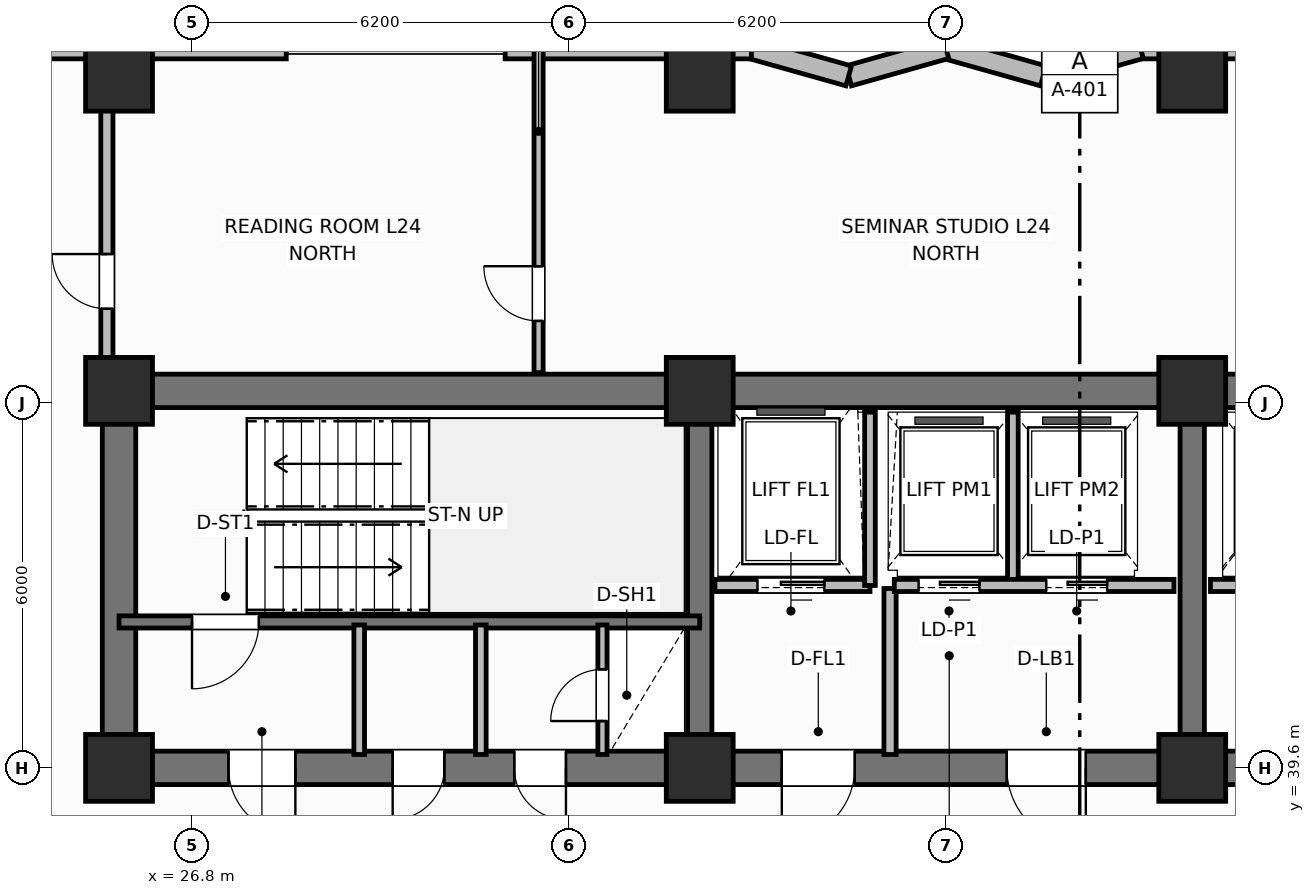
"""IFC4 building model, lengths in metres.
Left out: names, types, materials, properties, quantities, classifications, styles, units other than length and angle.
Written with IfcOpenShell. Run it as: python <this file> out.ifc"""

import sys

from ifc_helpers import new_model, si_unit, direction, frame, frame_2d, origin, origin_2d, place, context, subcontext, project, spatial, rectangle, extrude, element, fill, save


model = new_model("IFC4")
c1 = context("Model", 3, precision=1e-05, world=origin(), true_north=direction((0.0, 1.0)))
c2 = subcontext(c1, "Body", "Model", "MODEL_VIEW")
j1 = project(units=[si_unit("LENGTHUNIT", "METRE"), si_unit("PLANEANGLEUNIT", "RADIAN")], contexts=[c1])
p1 = place(None, origin())
s1 = spatial("IfcSite", under=j1, at=p1, CompositionType="ELEMENT")
p2 = place(p1, origin())
s2 = spatial("IfcBuilding", under=s1, at=p2, CompositionType="ELEMENT")
p3 = place(p2, frame((0.0, 0.0, 99.4)))
s3 = spatial("IfcBuildingStorey", under=s2, at=p3, CompositionType="ELEMENT", Elevation=99.4)
p4 = place(p3, frame((25.6, 45.8, 0.0), z_axis=(0.0, 0.0, 1.0), x_axis=(1.0, 0.0, 0.0)))
e1 = element("IfcWall", 1, at=p4, inside=s3, PredefinedType="SHEAR", context=c2, shape_type="SweptSolid", body=[
    extrude(rectangle(XDim=27.2, YDim=0.55, at=frame_2d((13.6, 0.0))), origin(), (0.0, 0.0, 1.0), 3.7),
])
p5 = place(p3, frame((25.6, 39.875, 0.0), z_axis=(0.0, 0.0, 1.0), x_axis=(0.0, 1.0, 0.0)))
e2 = element("IfcWall", 2, at=p5, inside=s3, PredefinedType="SHEAR", context=c2, shape_type="SweptSolid", body=[
    extrude(rectangle(XDim=5.65, YDim=0.55, at=frame_2d((2.825, 0.0))), origin(), (0.0, 0.0, 1.0), 3.7),
])
p6 = place(p3, frame((52.8, 39.6, 0.0), z_axis=(0.0, 0.0, 1.0), x_axis=(-1.0, 0.0, 0.0)))
e3 = element("IfcWall", 3, at=p6, inside=s3, PredefinedType="SHEAR", context=c2, shape_type="SweptSolid", body=[
    extrude(rectangle(XDim=27.2, YDim=0.55, at=frame_2d((13.6, 0.0))), origin(), (0.0, 0.0, 1.0), 3.7),
])
p7 = place(p6, frame((24.3, 0.0, 0.0)))
e4 = element("IfcOpeningElement", 4, at=p7, cuts=e3, PredefinedType="OPENING", context=c2, shape_type="SweptSolid", body=[
    extrude(rectangle(XDim=1.1, YDim=2.15, at=frame_2d((0.55, 1.075))), frame((0.0, 0.285, 0.0), z_axis=(0.0, -1.0, 0.0), x_axis=(1.0, 0.0, 0.0)), (0.0, 0.0, 1.0), 0.57),
])
p8 = place(p6, frame((21.85, 0.0, 0.0)))
e5 = element("IfcOpeningElement", 5, at=p8, cuts=e3, PredefinedType="OPENING", context=c2, shape_type="SweptSolid", body=[
    extrude(rectangle(XDim=0.85, YDim=2.1, at=frame_2d((0.425, 1.05))), frame((0.0, 0.285, 0.0), z_axis=(0.0, -1.0, 0.0), x_axis=(1.0, 0.0, 0.0)), (0.0, 0.0, 1.0), 0.57),
])
p9 = place(p6, frame((19.85, 0.0, 0.0)))
e6 = element("IfcOpeningElement", 6, at=p9, cuts=e3, PredefinedType="OPENING", context=c2, shape_type="SweptSolid", body=[
    extrude(rectangle(XDim=0.85, YDim=2.1, at=frame_2d((0.425, 1.05))), frame((0.0, 0.285, 0.0), z_axis=(0.0, -1.0, 0.0), x_axis=(1.0, 0.0, 0.0)), (0.0, 0.0, 1.0), 0.57),
])
p10 = place(p6, frame((15.1, 0.0, 0.0)))
e7 = element("IfcOpeningElement", 7, at=p10, cuts=e3, PredefinedType="OPENING", context=c2, shape_type="SweptSolid", body=[
    extrude(rectangle(XDim=1.2, YDim=2.15, at=frame_2d((0.6, 1.075))), frame((0.0, 0.285, 0.0), z_axis=(0.0, -1.0, 0.0), x_axis=(1.0, 0.0, 0.0)), (0.0, 0.0, 1.0), 0.57),
])
p11 = place(p6, frame((11.3, 0.0, 0.0)))
e8 = element("IfcOpeningElement", 8, at=p11, cuts=e3, PredefinedType="OPENING", context=c2, shape_type="SweptSolid", body=[
    extrude(rectangle(XDim=1.3, YDim=2.2, at=frame_2d((0.65, 1.1))), frame((0.0, 0.285, 0.0), z_axis=(0.0, -1.0, 0.0), x_axis=(1.0, 0.0, 0.0)), (0.0, 0.0, 1.0), 0.57),
])
p12 = place(p6, frame((7.25, 0.0, 0.0)))
e9 = element("IfcOpeningElement", 9, at=p12, cuts=e3, PredefinedType="OPENING", context=c2, shape_type="SweptSolid", body=[
    extrude(rectangle(XDim=0.85, YDim=2.1, at=frame_2d((0.425, 1.05))), frame((0.0, 0.285, 0.0), z_axis=(0.0, -1.0, 0.0), x_axis=(1.0, 0.0, 0.0)), (0.0, 0.0, 1.0), 0.57),
])
p13 = place(p6, frame((4.6, 0.0, 0.0)))
e10 = element("IfcOpeningElement", 10, at=p13, cuts=e3, PredefinedType="OPENING", context=c2, shape_type="SweptSolid", body=[
    extrude(rectangle(XDim=0.85, YDim=2.1, at=frame_2d((0.425, 1.05))), frame((0.0, 0.285, 0.0), z_axis=(0.0, -1.0, 0.0), x_axis=(1.0, 0.0, 0.0)), (0.0, 0.0, 1.0), 0.57),
])
p14 = place(p6, frame((1.9, 0.0, 0.0)))
e11 = element("IfcOpeningElement", 11, at=p14, cuts=e3, PredefinedType="OPENING", context=c2, shape_type="SweptSolid", body=[
    extrude(rectangle(XDim=0.85, YDim=2.1, at=frame_2d((0.425, 1.05))), frame((0.0, 0.285, 0.0), z_axis=(0.0, -1.0, 0.0), x_axis=(1.0, 0.0, 0.0)), (0.0, 0.0, 1.0), 0.57),
])
for number, where, z_axis, x_axis in (
    (12, (35.15, 39.875, 0.0), (0.0, 0.0, 1.0), (0.0, 1.0, 0.0)),
    (13, (43.25, 39.875, 0.0), (0.0, 0.0, 1.0), (0.0, 1.0, 0.0)),
):
    element("IfcWall", number, at=place(p3, frame(where, z_axis=z_axis, x_axis=x_axis)), inside=s3, PredefinedType="SHEAR", context=c2, shape_type="SweptSolid", body=[
        extrude(rectangle(XDim=5.65, YDim=0.4, at=frame_2d((2.825, 0.0))), origin(), (0.0, 0.0, 1.0), 3.7),
    ])
for number, where, z_axis, x_axis in (
    (14, (25.6, 39.6, 0.0), (0.0, 0.0, 1.0), (1.0, 0.0, 0.0)),
    (15, (25.6, 45.8, 0.0), (0.0, 0.0, 1.0), (1.0, 0.0, 0.0)),
    (16, (35.15, 39.6, 0.0), (0.0, 0.0, 1.0), (1.0, 0.0, 0.0)),
    (17, (35.15, 45.8, 0.0), (0.0, 0.0, 1.0), (1.0, 0.0, 0.0)),
    (18, (43.25, 39.6, 0.0), (0.0, 0.0, 1.0), (1.0, 0.0, 0.0)),
    (19, (43.25, 45.8, 0.0), (0.0, 0.0, 1.0), (1.0, 0.0, 0.0)),
    (20, (25.6, 50.95, 0.0), (0.0, 0.0, 1.0), (1.0, 0.0, 0.0)),
    (21, (35.15, 50.95, 0.0), (0.0, 0.0, 1.0), (1.0, 0.0, 0.0)),
    (22, (43.25, 50.95, 0.0), (0.0, 0.0, 1.0), (1.0, 0.0, 0.0)),
):
    element("IfcColumn", number, at=place(p3, frame(where, z_axis=z_axis, x_axis=x_axis)), inside=s3, PredefinedType="COLUMN", context=c2, shape_type="SweptSolid", body=[
        extrude(rectangle(XDim=1.1, YDim=1.1, at=origin_2d()), origin(), (0.0, 0.0, 1.0), 3.7),
    ])
p15 = place(p3, frame((55.35, 51.43, 0.0), z_axis=(0.0, 0.0, 1.0), x_axis=(-1.0, 0.0, 0.0)))
e23 = element("IfcWall", 23, at=p15, inside=s3, PredefinedType="SOLIDWALL", context=c2, shape_type="SweptSolid", body=[
    extrude(rectangle(XDim=12.95, YDim=0.34, at=frame_2d((6.475, 0.0))), origin(), (0.0, 0.0, 1.0), 2.7),
])
p16 = place(p15, frame((5.775, 0.0, 0.73)))
e24 = element("IfcOpeningElement", 24, at=p16, cuts=e23, PredefinedType="OPENING", context=c2, shape_type="SweptSolid", body=[
    extrude(rectangle(XDim=1.4, YDim=1.85, at=frame_2d((0.7, 0.925))), frame((0.0, 0.18, 0.0), z_axis=(0.0, -1.0, 0.0), x_axis=(1.0, 0.0, 0.0)), (0.0, 0.0, 1.0), 0.36),
])
p17 = place(p3, frame((42.4, 51.43, 0.0), z_axis=(0.0, 0.0, 1.0), x_axis=(-0.962652136636, -0.270741322725, 0.0)))
e25 = element("IfcWall", 25, at=p17, inside=s3, PredefinedType="SOLIDWALL", context=c2, shape_type="SweptSolid", body=[
    extrude(rectangle(XDim=1.662, YDim=0.34, at=frame_2d((0.831, 0.0))), origin(), (0.0, 0.0, 1.0), 2.7),
])
p18 = place(p3, frame((40.8, 50.98, 0.0), z_axis=(0.0, 0.0, 1.0), x_axis=(-0.962662902433, 0.270703040766, 0.0)))
e26 = element("IfcWall", 26, at=p18, inside=s3, PredefinedType="SOLIDWALL", context=c2, shape_type="SweptSolid", body=[
    extrude(rectangle(XDim=1.662, YDim=0.34, at=frame_2d((0.831, 0.0))), origin(), (0.0, 0.0, 1.0), 2.7),
])
p19 = place(p3, frame((39.2, 51.43, 0.0), z_axis=(0.0, 0.0, 1.0), x_axis=(-0.962652136636, -0.270741322725, 0.0)))
e27 = element("IfcWall", 27, at=p19, inside=s3, PredefinedType="SOLIDWALL", context=c2, shape_type="SweptSolid", body=[
    extrude(rectangle(XDim=1.662, YDim=0.34, at=frame_2d((0.831, 0.0))), origin(), (0.0, 0.0, 1.0), 2.7),
])
p20 = place(p3, frame((37.6, 50.98, 0.0), z_axis=(0.0, 0.0, 1.0), x_axis=(-0.962662902433, 0.270703040766, 0.0)))
e28 = element("IfcWall", 28, at=p20, inside=s3, PredefinedType="SOLIDWALL", context=c2, shape_type="SweptSolid", body=[
    extrude(rectangle(XDim=1.662, YDim=0.34, at=frame_2d((0.831, 0.0))), origin(), (0.0, 0.0, 1.0), 2.7),
])
p21 = place(p3, frame((36.0, 51.43, 0.0), z_axis=(0.0, 0.0, 1.0), x_axis=(-1.0, 0.0, 0.0)))
e29 = element("IfcWall", 29, at=p21, inside=s3, PredefinedType="SOLIDWALL", context=c2, shape_type="SweptSolid", body=[
    extrude(rectangle(XDim=4.05, YDim=0.34, at=frame_2d((2.025, 0.0))), origin(), (0.0, 0.0, 1.0), 2.7),
])
p22 = place(p3, frame((28.35, 51.43, 0.0), z_axis=(0.0, 0.0, 1.0), x_axis=(-1.0, 0.0, 0.0)))
e30 = element("IfcWall", 30, at=p22, inside=s3, PredefinedType="SOLIDWALL", context=c2, shape_type="SweptSolid", body=[
    extrude(rectangle(XDim=9.75, YDim=0.34, at=frame_2d((4.875, 0.0))), origin(), (0.0, 0.0, 1.0), 2.7),
])
p23 = place(p22, frame((6.992, 0.0, 0.73)))
e31 = element("IfcOpeningElement", 31, at=p23, cuts=e30, PredefinedType="OPENING", context=c2, shape_type="SweptSolid", body=[
    extrude(rectangle(XDim=1.4, YDim=1.85, at=frame_2d((0.7, 0.925))), frame((0.0, 0.18, 0.0), z_axis=(0.0, -1.0, 0.0), x_axis=(1.0, 0.0, 0.0)), (0.0, 0.0, 1.0), 0.36),
])
p24 = place(p3, frame((35.15, 42.0, 0.0), z_axis=(0.0, 0.0, 1.0), x_axis=(-1.0, 0.0, 0.0)))
e32 = element("IfcWall", 32, at=p24, inside=s3, PredefinedType="SHEAR", context=c2, shape_type="SweptSolid", body=[
    extrude(rectangle(XDim=9.55, YDim=0.2, at=frame_2d((4.775, 0.0))), origin(), (0.0, 0.0, 1.0), 3.7),
])
p25 = place(p24, frame((7.25, 0.0, 0.0)))
e33 = element("IfcOpeningElement", 33, at=p25, cuts=e32, PredefinedType="OPENING", context=c2, shape_type="SweptSolid", body=[
    extrude(rectangle(XDim=1.1, YDim=2.15, at=frame_2d((0.55, 1.075))), frame((0.0, 0.11, 0.0), z_axis=(0.0, -1.0, 0.0), x_axis=(1.0, 0.0, 0.0)), (0.0, 0.0, 1.0), 0.22),
])
p26 = place(p3, frame((33.55, 39.82, 0.0), z_axis=(0.0, 0.0, 1.0), x_axis=(0.0, 1.0, 0.0)))
e34 = element("IfcWall", 34, at=p26, inside=s3, PredefinedType="PARTITIONING", context=c2, shape_type="SweptSolid", body=[
    extrude(rectangle(XDim=2.13, YDim=0.15, at=frame_2d((1.065, 0.0))), origin(), (0.0, 0.0, 1.0), 2.53),
])
p27 = place(p26, frame((0.55, 0.0, 0.0)))
e35 = element("IfcOpeningElement", 35, at=p27, cuts=e34, PredefinedType="OPENING", context=c2, shape_type="SweptSolid", body=[
    extrude(rectangle(XDim=0.85, YDim=2.05, at=frame_2d((0.425, 1.025))), frame((0.0, 0.085, 0.0), z_axis=(0.0, -1.0, 0.0), x_axis=(1.0, 0.0, 0.0)), (0.0, 0.0, 1.0), 0.17),
])
for number, where, z_axis, x_axis in (
    (36, (29.55, 39.82, 0.0), (0.0, 0.0, 1.0), (0.0, 1.0, 0.0)),
    (37, (31.55, 39.82, 0.0), (0.0, 0.0, 1.0), (0.0, 1.0, 0.0)),
):
    element("IfcWall", number, at=place(p3, frame(where, z_axis=z_axis, x_axis=x_axis)), inside=s3, PredefinedType="PARTITIONING", context=c2, shape_type="SweptSolid", body=[
        extrude(rectangle(XDim=2.13, YDim=0.175, at=frame_2d((1.065, 0.0))), origin(), (0.0, 0.0, 1.0), 2.53),
    ])
p28 = place(p3, frame((37.95, 42.6, 0.0), z_axis=(0.0, 0.0, 1.0), x_axis=(-1.0, 0.0, 0.0)))
e38 = element("IfcWall", 38, at=p28, inside=s3, PredefinedType="PARTITIONING", context=c2, shape_type="SweptSolid", body=[
    extrude(rectangle(XDim=2.55, YDim=0.2, at=frame_2d((1.275, 0.0))), origin(), (0.0, 0.0, 1.0), 2.3),
])
p29 = place(p28, frame((0.75, 0.0, 0.0)))
e39 = element("IfcOpeningElement", 39, at=p29, cuts=e38, PredefinedType="OPENING", context=c2, shape_type="SweptSolid", body=[
    extrude(rectangle(XDim=1.1, YDim=2.15, at=frame_2d((0.55, 1.075))), frame((0.0, 0.11, 0.0), z_axis=(0.0, -1.0, 0.0), x_axis=(1.0, 0.0, 0.0)), (0.0, 0.0, 1.0), 0.22),
])
p30 = place(p3, frame((37.95, 42.6, 0.0), z_axis=(0.0, 0.0, 1.0), x_axis=(0.0, 1.0, 0.0)))
e40 = element("IfcWall", 40, at=p30, inside=s3, PredefinedType="PARTITIONING", context=c2, shape_type="SweptSolid", body=[
    extrude(rectangle(XDim=2.85, YDim=0.175, at=frame_2d((1.425, 0.0))), origin(), (0.0, 0.0, 1.0), 2.53),
])
p31 = place(p3, frame((38.28, 39.82, 0.0), z_axis=(0.0, 0.0, 1.0), x_axis=(0.0, 1.0, 0.0)))
e41 = element("IfcWall", 41, at=p31, inside=s3, PredefinedType="PARTITIONING", context=c2, shape_type="SweptSolid", body=[
    extrude(rectangle(XDim=2.73, YDim=0.2, at=frame_2d((1.365, 0.0))), origin(), (0.0, 0.0, 1.0), 2.53),
])
p32 = place(p3, frame((40.3, 42.65, 0.0), z_axis=(0.0, 0.0, 1.0), x_axis=(0.0, 1.0, 0.0)))
e42 = element("IfcWall", 42, at=p32, inside=s3, PredefinedType="PARTITIONING", context=c2, shape_type="SweptSolid", body=[
    extrude(rectangle(XDim=2.8, YDim=0.175, at=frame_2d((1.4, 0.0))), origin(), (0.0, 0.0, 1.0), 2.53),
])
p33 = place(p3, frame((42.95, 42.6, 0.0), z_axis=(0.0, 0.0, 1.0), x_axis=(-1.0, 0.0, 0.0)))
e43 = element("IfcWall", 43, at=p33, inside=s3, PredefinedType="PARTITIONING", context=c2, shape_type="SweptSolid", body=[
    extrude(rectangle(XDim=4.6, YDim=0.2, at=frame_2d((2.3, 0.0))), origin(), (0.0, 0.0, 1.0), 2.3),
])
p34 = place(p33, frame((3.2, 0.0, 0.0)))
e44 = element("IfcOpeningElement", 44, at=p34, cuts=e43, PredefinedType="OPENING", context=c2, shape_type="SweptSolid", body=[
    extrude(rectangle(XDim=1.0, YDim=2.15, at=frame_2d((0.5, 1.075))), frame((0.0, 0.11, 0.0), z_axis=(0.0, -1.0, 0.0), x_axis=(1.0, 0.0, 0.0)), (0.0, 0.0, 1.0), 0.22),
])
p35 = place(p33, frame((1.1, 0.0, 0.0)))
e45 = element("IfcOpeningElement", 45, at=p35, cuts=e43, PredefinedType="OPENING", context=c2, shape_type="SweptSolid", body=[
    extrude(rectangle(XDim=1.0, YDim=2.15, at=frame_2d((0.5, 1.075))), frame((0.0, 0.11, 0.0), z_axis=(0.0, -1.0, 0.0), x_axis=(1.0, 0.0, 0.0)), (0.0, 0.0, 1.0), 0.22),
])
p36 = place(p3, frame((52.35, 42.6, 0.0), z_axis=(0.0, 0.0, 1.0), x_axis=(-1.0, 0.0, 0.0)))
e46 = element("IfcWall", 46, at=p36, inside=s3, PredefinedType="PARTITIONING", context=c2, shape_type="SweptSolid", body=[
    extrude(rectangle(XDim=8.8, YDim=0.2, at=frame_2d((4.4, 0.0))), origin(), (0.0, 0.0, 1.0), 2.53),
])
p37 = place(p36, frame((7.1, 0.0, 0.0)))
e47 = element("IfcOpeningElement", 47, at=p37, cuts=e46, PredefinedType="OPENING", context=c2, shape_type="SweptSolid", body=[
    extrude(rectangle(XDim=1.0, YDim=2.15, at=frame_2d((0.5, 1.075))), frame((0.0, 0.11, 0.0), z_axis=(0.0, -1.0, 0.0), x_axis=(1.0, 0.0, 0.0)), (0.0, 0.0, 1.0), 0.22),
])
p38 = place(p3, frame((32.5, 46.1, 0.0), z_axis=(0.0, 0.0, 1.0), x_axis=(0.0, 1.0, 0.0)))
e48 = element("IfcWall", 48, at=p38, inside=s3, PredefinedType="PARTITIONING", context=c2, shape_type="SweptSolid", body=[
    extrude(rectangle(XDim=5.33, YDim=0.15, at=frame_2d((2.665, 0.0))), origin(), (0.0, 0.0, 1.0), 2.53),
])
p39 = place(p38, frame((0.85, 0.0, 0.0)))
e49 = element("IfcOpeningElement", 49, at=p39, cuts=e48, PredefinedType="OPENING", context=c2, shape_type="SweptSolid", body=[
    extrude(rectangle(XDim=0.9, YDim=2.1, at=frame_2d((0.45, 1.05))), frame((0.0, 0.085, 0.0), z_axis=(0.0, -1.0, 0.0), x_axis=(1.0, 0.0, 0.0)), (0.0, 0.0, 1.0), 0.17),
])
p40 = place(p3, frame((25.4, 46.1, 0.0), z_axis=(0.0, 0.0, 1.0), x_axis=(0.0, 1.0, 0.0)))
e50 = element("IfcWall", 50, at=p40, inside=s3, PredefinedType="PARTITIONING", context=c2, shape_type="SweptSolid", body=[
    extrude(rectangle(XDim=4.33, YDim=0.2, at=frame_2d((2.165, 0.0))), origin(), (0.0, 0.0, 1.0), 2.53),
])
p41 = place(p40, frame((1.05, 0.0, 0.0)))
e51 = element("IfcOpeningElement", 51, at=p41, cuts=e50, PredefinedType="OPENING", context=c2, shape_type="SweptSolid", body=[
    extrude(rectangle(XDim=0.9, YDim=2.1, at=frame_2d((0.45, 1.05))), frame((0.0, 0.11, 0.0), z_axis=(0.0, -1.0, 0.0), x_axis=(1.0, 0.0, 0.0)), (0.0, 0.0, 1.0), 0.22),
])
p42 = place(p25, origin())
e52 = element("IfcDoor", 52, at=p42, inside=s3, OperationType="SINGLE_SWING_RIGHT", PredefinedType="DOOR", context=c2, shape_type="SweptSolid", body=[
    extrude(rectangle(XDim=1.1, YDim=2.15, at=frame_2d((0.55, 1.075))), frame((0.0, 0.025, 0.0), z_axis=(0.0, -1.0, 0.0), x_axis=(1.0, 0.0, 0.0)), (0.0, 0.0, 1.0), 0.05),
])
fill(e33, e52)
p43 = place(p27, origin())
e53 = element("IfcDoor", 53, at=p43, inside=s3, OperationType="SINGLE_SWING_LEFT", PredefinedType="TRAPDOOR", context=c2, shape_type="SweptSolid", body=[
    extrude(rectangle(XDim=0.85, YDim=2.05, at=frame_2d((0.425, 1.025))), frame((0.0, 0.025, 0.0), z_axis=(0.0, -1.0, 0.0), x_axis=(1.0, 0.0, 0.0)), (0.0, 0.0, 1.0), 0.05),
])
fill(e35, e53)
p44 = place(p29, origin())
e54 = element("IfcDoor", 54, at=p44, inside=s3, OperationType="SLIDING_TO_LEFT", PredefinedType="DOOR", context=c2, shape_type="SweptSolid", body=[
    extrude(rectangle(XDim=1.1, YDim=2.15, at=frame_2d((0.55, 1.075))), frame((0.0, 0.025, 0.0), z_axis=(0.0, -1.0, 0.0), x_axis=(1.0, 0.0, 0.0)), (0.0, 0.0, 1.0), 0.05),
])
fill(e39, e54)
p45 = place(p34, origin())
e55 = element("IfcDoor", 55, at=p45, inside=s3, OperationType="SLIDING_TO_LEFT", PredefinedType="DOOR", context=c2, shape_type="SweptSolid", body=[
    extrude(rectangle(XDim=1.0, YDim=2.15, at=frame_2d((0.5, 1.075))), frame((0.0, 0.025, 0.0), z_axis=(0.0, -1.0, 0.0), x_axis=(1.0, 0.0, 0.0)), (0.0, 0.0, 1.0), 0.05),
])
fill(e44, e55)
p46 = place(p35, origin())
e56 = element("IfcDoor", 56, at=p46, inside=s3, OperationType="SLIDING_TO_LEFT", PredefinedType="DOOR", context=c2, shape_type="SweptSolid", body=[
    extrude(rectangle(XDim=1.0, YDim=2.15, at=frame_2d((0.5, 1.075))), frame((0.0, 0.025, 0.0), z_axis=(0.0, -1.0, 0.0), x_axis=(1.0, 0.0, 0.0)), (0.0, 0.0, 1.0), 0.05),
])
fill(e45, e56)
p47 = place(p39, origin())
e57 = element("IfcDoor", 57, at=p47, inside=s3, OperationType="SINGLE_SWING_RIGHT", PredefinedType="DOOR", context=c2, shape_type="SweptSolid", body=[
    extrude(rectangle(XDim=0.9, YDim=2.1, at=frame_2d((0.45, 1.05))), frame((0.0, 0.025, 0.0), z_axis=(0.0, -1.0, 0.0), x_axis=(1.0, 0.0, 0.0)), (0.0, 0.0, 1.0), 0.05),
])
fill(e49, e57)
p48 = place(p41, origin())
e58 = element("IfcDoor", 58, at=p48, inside=s3, OperationType="SINGLE_SWING_RIGHT", PredefinedType="DOOR", context=c2, shape_type="SweptSolid", body=[
    extrude(rectangle(XDim=0.9, YDim=2.1, at=frame_2d((0.45, 1.05))), frame((0.0, 0.025, 0.0), z_axis=(0.0, -1.0, 0.0), x_axis=(1.0, 0.0, 0.0)), (0.0, 0.0, 1.0), 0.05),
])
fill(e51, e58)
p49 = place(p7, origin())
e59 = element("IfcDoor", 59, at=p49, inside=s3, OperationType="SINGLE_SWING_LEFT", PredefinedType="DOOR", context=c2, shape_type="SweptSolid", body=[
    extrude(rectangle(XDim=1.1, YDim=2.15, at=frame_2d((0.55, 1.075))), frame((0.0, 0.025, 0.0), z_axis=(0.0, -1.0, 0.0), x_axis=(1.0, 0.0, 0.0)), (0.0, 0.0, 1.0), 0.05),
])
fill(e4, e59)
p50 = place(p8, origin())
e60 = element("IfcDoor", 60, at=p50, inside=s3, OperationType="SINGLE_SWING_RIGHT", PredefinedType="DOOR", context=c2, shape_type="SweptSolid", body=[
    extrude(rectangle(XDim=0.85, YDim=2.1, at=frame_2d((0.425, 1.05))), frame((0.0, 0.025, 0.0), z_axis=(0.0, -1.0, 0.0), x_axis=(1.0, 0.0, 0.0)), (0.0, 0.0, 1.0), 0.05),
])
fill(e5, e60)
p51 = place(p9, origin())
e61 = element("IfcDoor", 61, at=p51, inside=s3, OperationType="SINGLE_SWING_LEFT", PredefinedType="DOOR", context=c2, shape_type="SweptSolid", body=[
    extrude(rectangle(XDim=0.85, YDim=2.1, at=frame_2d((0.425, 1.05))), frame((0.0, 0.025, 0.0), z_axis=(0.0, -1.0, 0.0), x_axis=(1.0, 0.0, 0.0)), (0.0, 0.0, 1.0), 0.05),
])
fill(e6, e61)
p52 = place(p10, origin())
e62 = element("IfcDoor", 62, at=p52, inside=s3, OperationType="SINGLE_SWING_RIGHT", PredefinedType="DOOR", context=c2, shape_type="SweptSolid", body=[
    extrude(rectangle(XDim=1.2, YDim=2.15, at=frame_2d((0.6, 1.075))), frame((0.0, 0.025, 0.0), z_axis=(0.0, -1.0, 0.0), x_axis=(1.0, 0.0, 0.0)), (0.0, 0.0, 1.0), 0.05),
])
fill(e7, e62)
p53 = place(p11, origin())
e63 = element("IfcDoor", 63, at=p53, inside=s3, OperationType="SINGLE_SWING_LEFT", PredefinedType="DOOR", context=c2, shape_type="SweptSolid", body=[
    extrude(rectangle(XDim=1.3, YDim=2.2, at=frame_2d((0.65, 1.1))), frame((0.0, 0.025, 0.0), z_axis=(0.0, -1.0, 0.0), x_axis=(1.0, 0.0, 0.0)), (0.0, 0.0, 1.0), 0.05),
])
fill(e8, e63)
save(model, sys.argv[1])
